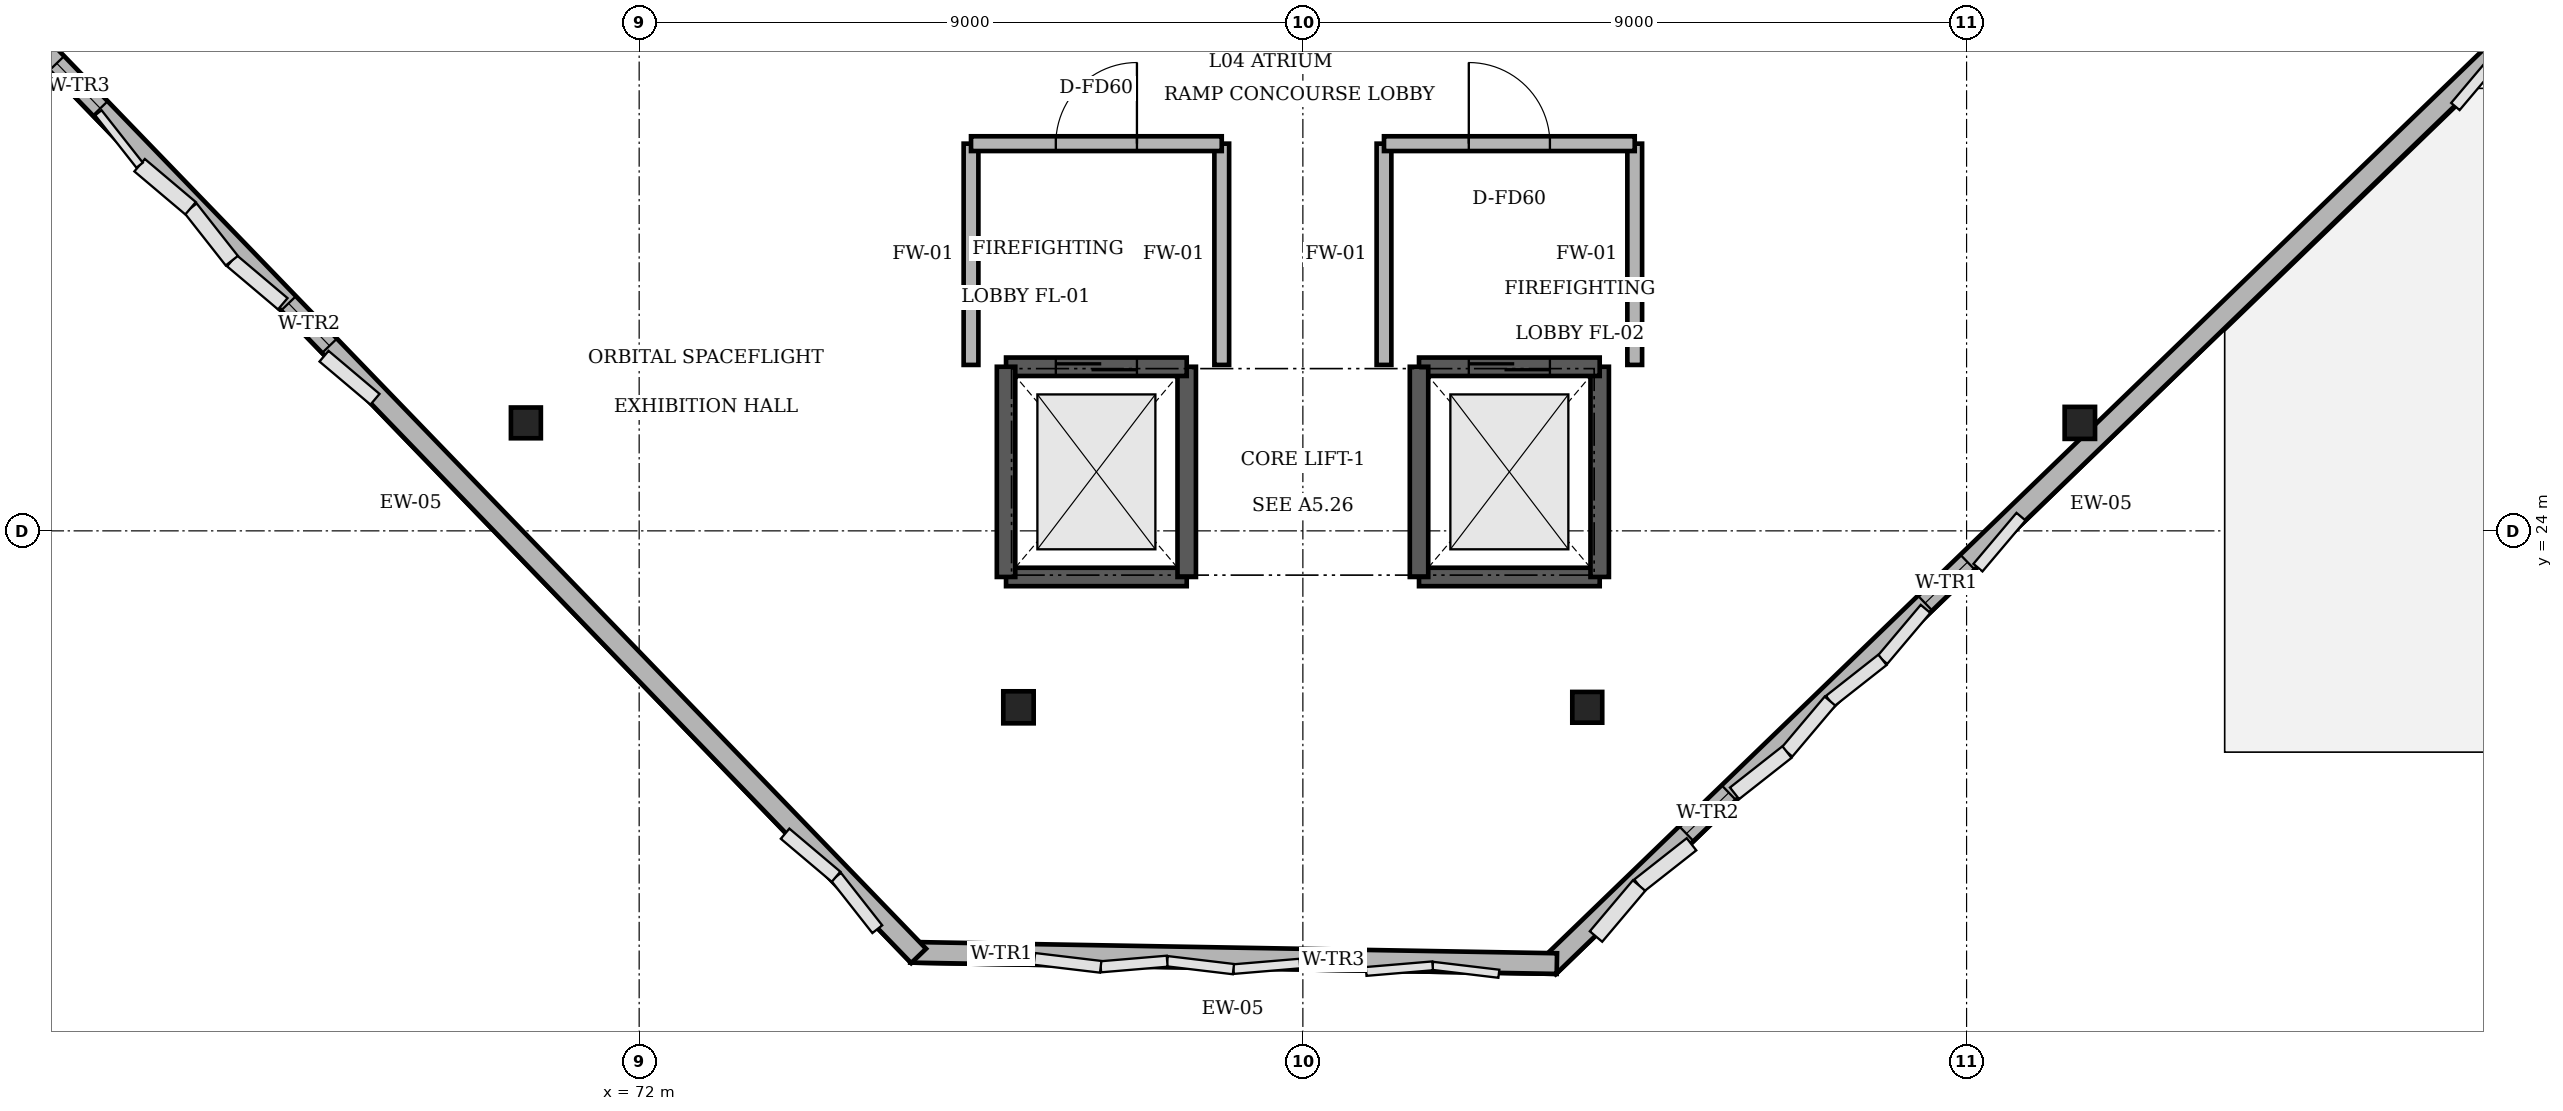
"""IFC4 building model, lengths in metres.
Left out: names, types, materials, properties, quantities, classifications, styles, units other than length and angle.
Written with IfcOpenShell. Run it as: python <this file> out.ifc"""

import sys

from ifc_helpers import new_model, si_unit, direction, frame, frame_2d, origin, origin_2d, place, context, subcontext, project, spatial, rectangle, i_section, extrude, element, fill, save


model = new_model("IFC4")
c1 = context("Model", 3, precision=1e-05, world=origin(), true_north=direction((0.0, 1.0)))
c2 = subcontext(c1, "Body", "Model", "MODEL_VIEW")
j1 = project(units=[si_unit("LENGTHUNIT", "METRE"), si_unit("PLANEANGLEUNIT", "RADIAN")], contexts=[c1])
p1 = place(None, origin())
s1 = spatial("IfcSite", under=j1, at=p1, CompositionType="ELEMENT")
p2 = place(p1, origin())
s2 = spatial("IfcBuilding", under=s1, at=p2, CompositionType="ELEMENT")
p3 = place(p2, frame((0.0, 0.0, 20.4)))
s3 = spatial("IfcBuildingStorey", under=s2, at=p3, CompositionType="ELEMENT", Elevation=20.4)
p4 = place(p3, frame((70.464, 25.464, 0.0), z_axis=(0.0, 0.0, 1.0), x_axis=(1.0, 0.0, 0.0)))
e1 = element("IfcColumn", 1, at=p4, inside=s3, PredefinedType="COLUMN", context=c2, shape_type="SweptSolid", body=[
    extrude(i_section(OverallWidth=0.406, OverallDepth=0.417, WebThickness=0.03, FlangeThickness=0.044, FilletRadius=0.015, at=origin_2d()), origin(), (0.0, 0.0, 1.0), 4.8),
])
p5 = place(p3, frame((77.144, 21.608, 0.0), z_axis=(0.0, 0.0, 1.0), x_axis=(1.0, 0.0, 0.0)))
e2 = element("IfcColumn", 2, at=p5, inside=s3, PredefinedType="COLUMN", context=c2, shape_type="SweptSolid", body=[
    extrude(i_section(OverallWidth=0.412, OverallDepth=0.434, WebThickness=0.036, FlangeThickness=0.044, FilletRadius=0.015, at=origin_2d()), origin(), (0.0, 0.0, 1.0), 4.8),
])
p6 = place(p3, frame((84.856, 21.608, 0.0), z_axis=(0.0, 0.0, 1.0), x_axis=(1.0, 0.0, 0.0)))
e3 = element("IfcColumn", 3, at=p6, inside=s3, PredefinedType="COLUMN", context=c2, shape_type="SweptSolid", body=[
    extrude(i_section(OverallWidth=0.406, OverallDepth=0.417, WebThickness=0.03, FlangeThickness=0.044, FilletRadius=0.015, at=origin_2d()), origin(), (0.0, 0.0, 1.0), 4.8),
])
p7 = place(p3, frame((91.536, 25.464, 0.0), z_axis=(0.0, 0.0, 1.0), x_axis=(1.0, 0.0, 0.0)))
e4 = element("IfcColumn", 4, at=p7, inside=s3, PredefinedType="COLUMN", context=c2, shape_type="SweptSolid", body=[
    extrude(i_section(OverallWidth=0.412, OverallDepth=0.434, WebThickness=0.036, FlangeThickness=0.044, FilletRadius=0.015, at=origin_2d()), origin(), (0.0, 0.0, 1.0), 4.8),
])
p8 = place(p3, frame((98.357, 31.634, 0.0), z_axis=(0.0, 0.0, 1.0), x_axis=(-0.719349899293, -0.694647912533, 0.0)))
e5 = element("IfcWall", 5, at=p8, inside=s3, PredefinedType="SOLIDWALL", context=c2, shape_type="SweptSolid", body=[
    extrude(rectangle(XDim=19.5, YDim=0.28, at=frame_2d((9.75, 0.0))), origin(), (0.0, 0.0, 1.0), 3.484),
])
p9 = place(p8, frame((11.6, 0.0, 1.05)))
e6 = element("IfcOpeningElement", 6, at=p9, cuts=e5, PredefinedType="OPENING", context=c2, shape_type="SweptSolid", body=[
    extrude(rectangle(XDim=0.8, YDim=1.5, at=frame_2d((0.4, 0.75))), frame((0.0, 0.15, 0.0), z_axis=(0.0, -1.0, 0.0), x_axis=(1.0, 0.0, 0.0)), (0.0, 0.0, 1.0), 0.3),
])
p10 = place(p8, frame((16.1, 0.0, 1.05)))
e7 = element("IfcOpeningElement", 7, at=p10, cuts=e5, PredefinedType="OPENING", context=c2, shape_type="SweptSolid", body=[
    extrude(rectangle(XDim=0.8, YDim=1.7, at=frame_2d((0.4, 0.85))), frame((0.0, 0.15, 0.0), z_axis=(0.0, -1.0, 0.0), x_axis=(1.0, 0.0, 0.0)), (0.0, 0.0, 1.0), 0.3),
])
p11 = place(p3, frame((84.444, 18.133, 0.0), z_axis=(0.0, 0.0, 1.0), x_axis=(-0.999847586528, 0.017458628627, 0.0)))
e8 = element("IfcWall", 8, at=p11, inside=s3, PredefinedType="SOLIDWALL", context=c2, shape_type="SweptSolid", body=[
    extrude(rectangle(XDim=8.768, YDim=0.28, at=frame_2d((4.384, 0.0))), origin(), (0.0, 0.0, 1.0), 3.629),
])
p12 = place(p11, frame((2.609, 0.0, 1.05)))
e9 = element("IfcOpeningElement", 9, at=p12, cuts=e8, PredefinedType="OPENING", context=c2, shape_type="SweptSolid", body=[
    extrude(rectangle(XDim=0.85, YDim=1.6, at=frame_2d((0.425, 0.8))), frame((0.0, 0.15, 0.0), z_axis=(0.0, -1.0, 0.0), x_axis=(1.0, 0.0, 0.0)), (0.0, 0.0, 1.0), 0.3),
])
p13 = place(p11, frame((7.134, 0.0, 1.05)))
e10 = element("IfcOpeningElement", 10, at=p13, cuts=e8, PredefinedType="OPENING", context=c2, shape_type="SweptSolid", body=[
    extrude(rectangle(XDim=0.8, YDim=1.5, at=frame_2d((0.4, 0.75))), frame((0.0, 0.15, 0.0), z_axis=(0.0, -1.0, 0.0), x_axis=(1.0, 0.0, 0.0)), (0.0, 0.0, 1.0), 0.3),
])
p14 = place(p3, frame((75.79, 18.237, 0.0), z_axis=(0.0, 0.0, 1.0), x_axis=(-0.694666022077, 0.719332411179, 0.0)))
e11 = element("IfcWall", 11, at=p14, inside=s3, PredefinedType="SOLIDWALL", context=c2, shape_type="SweptSolid", body=[
    extrude(rectangle(XDim=18.4, YDim=0.28, at=frame_2d((9.2, 0.0))), origin(), (0.0, 0.0, 1.0), 3.634),
])
p15 = place(p14, frame((11.5, 0.0, 1.05)))
e12 = element("IfcOpeningElement", 12, at=p15, cuts=e11, PredefinedType="OPENING", context=c2, shape_type="SweptSolid", body=[
    extrude(rectangle(XDim=0.8, YDim=1.7, at=frame_2d((0.4, 0.85))), frame((0.0, 0.15, 0.0), z_axis=(0.0, -1.0, 0.0), x_axis=(1.0, 0.0, 0.0)), (0.0, 0.0, 1.0), 0.3),
])
p16 = place(p14, frame((15.975, 0.0, 1.05)))
e13 = element("IfcOpeningElement", 13, at=p16, cuts=e11, PredefinedType="OPENING", context=c2, shape_type="SweptSolid", body=[
    extrude(rectangle(XDim=0.85, YDim=1.6, at=frame_2d((0.425, 0.8))), frame((0.0, 0.15, 0.0), z_axis=(0.0, -1.0, 0.0), x_axis=(1.0, 0.0, 0.0)), (0.0, 0.0, 1.0), 0.3),
])
p17 = place(p3, frame((76.975, 23.375, 0.0), z_axis=(0.0, 0.0, 1.0), x_axis=(1.0, 0.0, 0.0)))
e14 = element("IfcWall", 14, at=p17, inside=s3, PredefinedType="SOLIDWALL", context=c2, shape_type="SweptSolid", body=[
    extrude(rectangle(XDim=2.45, YDim=0.25, at=frame_2d((1.225, 0.0))), origin(), (0.0, 0.0, 1.0), 4.8),
])
p18 = place(p3, frame((79.425, 23.375, 0.0), z_axis=(0.0, 0.0, 1.0), x_axis=(0.0, 1.0, 0.0)))
e15 = element("IfcWall", 15, at=p18, inside=s3, PredefinedType="SOLIDWALL", context=c2, shape_type="SweptSolid", body=[
    extrude(rectangle(XDim=2.85, YDim=0.25, at=frame_2d((1.425, 0.0))), origin(), (0.0, 0.0, 1.0), 4.8),
])
p19 = place(p3, frame((79.425, 26.225, 0.0), z_axis=(0.0, 0.0, 1.0), x_axis=(-1.0, 0.0, 0.0)))
e16 = element("IfcWall", 16, at=p19, inside=s3, PredefinedType="SOLIDWALL", context=c2, shape_type="SweptSolid", body=[
    extrude(rectangle(XDim=2.45, YDim=0.25, at=frame_2d((1.225, 0.0))), origin(), (0.0, 0.0, 1.0), 4.8),
])
p20 = place(p19, frame((0.675, 0.0, 0.0)))
e17 = element("IfcOpeningElement", 17, at=p20, cuts=e16, PredefinedType="OPENING", context=c2, shape_type="SweptSolid", body=[
    extrude(rectangle(XDim=1.1, YDim=2.2, at=frame_2d((0.55, 1.1))), frame((0.0, 0.135, 0.0), z_axis=(0.0, -1.0, 0.0), x_axis=(1.0, 0.0, 0.0)), (0.0, 0.0, 1.0), 0.27),
])
p21 = place(p3, frame((76.975, 26.225, 0.0), z_axis=(0.0, 0.0, 1.0), x_axis=(0.0, -1.0, 0.0)))
e18 = element("IfcWall", 18, at=p21, inside=s3, PredefinedType="SOLIDWALL", context=c2, shape_type="SweptSolid", body=[
    extrude(rectangle(XDim=2.85, YDim=0.25, at=frame_2d((1.425, 0.0))), origin(), (0.0, 0.0, 1.0), 4.8),
])
p22 = place(p3, frame((76.5, 26.25, 0.0), z_axis=(0.0, 0.0, 1.0), x_axis=(0.0, 1.0, 0.0)))
e19 = element("IfcWall", 19, at=p22, inside=s3, PredefinedType="SOLIDWALL", context=c2, shape_type="SweptSolid", body=[
    extrude(rectangle(XDim=3.0, YDim=0.2, at=frame_2d((1.5, 0.0))), origin(), (0.0, 0.0, 1.0), 3.626),
])
p23 = place(p3, frame((79.9, 26.25, 0.0), z_axis=(0.0, 0.0, 1.0), x_axis=(0.0, 1.0, 0.0)))
e20 = element("IfcWall", 20, at=p23, inside=s3, PredefinedType="SOLIDWALL", context=c2, shape_type="SweptSolid", body=[
    extrude(rectangle(XDim=3.0, YDim=0.2, at=frame_2d((1.5, 0.0))), origin(), (0.0, 0.0, 1.0), 3.629),
])
p24 = place(p3, frame((76.5, 29.25, 0.0), z_axis=(0.0, 0.0, 1.0), x_axis=(1.0, 0.0, 0.0)))
e21 = element("IfcWall", 21, at=p24, inside=s3, PredefinedType="SOLIDWALL", context=c2, shape_type="SweptSolid", body=[
    extrude(rectangle(XDim=3.4, YDim=0.2, at=frame_2d((1.7, 0.0))), origin(), (0.0, 0.0, 1.0), 3.626),
])
p25 = place(p24, frame((1.15, 0.0, 0.0)))
e22 = element("IfcOpeningElement", 22, at=p25, cuts=e21, PredefinedType="OPENING", context=c2, shape_type="SweptSolid", body=[
    extrude(rectangle(XDim=1.1, YDim=2.2, at=frame_2d((0.55, 1.1))), frame((0.0, 0.11, 0.0), z_axis=(0.0, -1.0, 0.0), x_axis=(1.0, 0.0, 0.0)), (0.0, 0.0, 1.0), 0.22),
])
p26 = place(p3, frame((82.575, 23.375, 0.0), z_axis=(0.0, 0.0, 1.0), x_axis=(1.0, 0.0, 0.0)))
e23 = element("IfcWall", 23, at=p26, inside=s3, PredefinedType="SOLIDWALL", context=c2, shape_type="SweptSolid", body=[
    extrude(rectangle(XDim=2.45, YDim=0.25, at=frame_2d((1.225, 0.0))), origin(), (0.0, 0.0, 1.0), 4.8),
])
p27 = place(p3, frame((85.025, 23.375, 0.0), z_axis=(0.0, 0.0, 1.0), x_axis=(0.0, 1.0, 0.0)))
e24 = element("IfcWall", 24, at=p27, inside=s3, PredefinedType="SOLIDWALL", context=c2, shape_type="SweptSolid", body=[
    extrude(rectangle(XDim=2.85, YDim=0.25, at=frame_2d((1.425, 0.0))), origin(), (0.0, 0.0, 1.0), 4.8),
])
p28 = place(p3, frame((85.025, 26.225, 0.0), z_axis=(0.0, 0.0, 1.0), x_axis=(-1.0, 0.0, 0.0)))
e25 = element("IfcWall", 25, at=p28, inside=s3, PredefinedType="SOLIDWALL", context=c2, shape_type="SweptSolid", body=[
    extrude(rectangle(XDim=2.45, YDim=0.25, at=frame_2d((1.225, 0.0))), origin(), (0.0, 0.0, 1.0), 4.8),
])
p29 = place(p28, frame((0.675, 0.0, 0.0)))
e26 = element("IfcOpeningElement", 26, at=p29, cuts=e25, PredefinedType="OPENING", context=c2, shape_type="SweptSolid", body=[
    extrude(rectangle(XDim=1.1, YDim=2.2, at=frame_2d((0.55, 1.1))), frame((0.0, 0.135, 0.0), z_axis=(0.0, -1.0, 0.0), x_axis=(1.0, 0.0, 0.0)), (0.0, 0.0, 1.0), 0.27),
])
p30 = place(p3, frame((82.575, 26.225, 0.0), z_axis=(0.0, 0.0, 1.0), x_axis=(0.0, -1.0, 0.0)))
e27 = element("IfcWall", 27, at=p30, inside=s3, PredefinedType="SOLIDWALL", context=c2, shape_type="SweptSolid", body=[
    extrude(rectangle(XDim=2.85, YDim=0.25, at=frame_2d((1.425, 0.0))), origin(), (0.0, 0.0, 1.0), 4.8),
])
p31 = place(p3, frame((82.1, 26.25, 0.0), z_axis=(0.0, 0.0, 1.0), x_axis=(0.0, 1.0, 0.0)))
e28 = element("IfcWall", 28, at=p31, inside=s3, PredefinedType="SOLIDWALL", context=c2, shape_type="SweptSolid", body=[
    extrude(rectangle(XDim=3.0, YDim=0.2, at=frame_2d((1.5, 0.0))), origin(), (0.0, 0.0, 1.0), 4.0),
])
p32 = place(p3, frame((85.5, 26.25, 0.0), z_axis=(0.0, 0.0, 1.0), x_axis=(0.0, 1.0, 0.0)))
e29 = element("IfcWall", 29, at=p32, inside=s3, PredefinedType="SOLIDWALL", context=c2, shape_type="SweptSolid", body=[
    extrude(rectangle(XDim=3.0, YDim=0.2, at=frame_2d((1.5, 0.0))), origin(), (0.0, 0.0, 1.0), 3.624),
])
p33 = place(p3, frame((82.1, 29.25, 0.0), z_axis=(0.0, 0.0, 1.0), x_axis=(1.0, 0.0, 0.0)))
e30 = element("IfcWall", 30, at=p33, inside=s3, PredefinedType="SOLIDWALL", context=c2, shape_type="SweptSolid", body=[
    extrude(rectangle(XDim=3.4, YDim=0.2, at=frame_2d((1.7, 0.0))), origin(), (0.0, 0.0, 1.0), 3.624),
])
p34 = place(p33, frame((1.15, 0.0, 0.0)))
e31 = element("IfcOpeningElement", 31, at=p34, cuts=e30, PredefinedType="OPENING", context=c2, shape_type="SweptSolid", body=[
    extrude(rectangle(XDim=1.1, YDim=2.2, at=frame_2d((0.55, 1.1))), frame((0.0, 0.11, 0.0), z_axis=(0.0, -1.0, 0.0), x_axis=(1.0, 0.0, 0.0)), (0.0, 0.0, 1.0), 0.22),
])
p35 = place(p9, origin())
e32 = element("IfcWindow", 32, at=p35, inside=s3, PartitioningType="SINGLE_PANEL", PredefinedType="WINDOW", context=c2, shape_type="SweptSolid", body=[
    extrude(rectangle(XDim=0.8, YDim=1.5, at=frame_2d((0.4, 0.75))), frame((0.0, 0.03, 0.0), z_axis=(0.0, -1.0, 0.0), x_axis=(1.0, 0.0, 0.0)), (0.0, 0.0, 1.0), 0.06),
])
fill(e6, e32)
p36 = place(p10, origin())
e33 = element("IfcWindow", 33, at=p36, inside=s3, PartitioningType="SINGLE_PANEL", PredefinedType="WINDOW", context=c2, shape_type="SweptSolid", body=[
    extrude(rectangle(XDim=0.8, YDim=1.7, at=frame_2d((0.4, 0.85))), frame((0.0, 0.03, 0.0), z_axis=(0.0, -1.0, 0.0), x_axis=(1.0, 0.0, 0.0)), (0.0, 0.0, 1.0), 0.06),
])
fill(e7, e33)
p37 = place(p12, origin())
e34 = element("IfcWindow", 34, at=p37, inside=s3, PartitioningType="SINGLE_PANEL", PredefinedType="WINDOW", context=c2, shape_type="SweptSolid", body=[
    extrude(rectangle(XDim=0.85, YDim=1.6, at=frame_2d((0.425, 0.8))), frame((0.0, 0.03, 0.0), z_axis=(0.0, -1.0, 0.0), x_axis=(1.0, 0.0, 0.0)), (0.0, 0.0, 1.0), 0.06),
])
fill(e9, e34)
p38 = place(p13, origin())
e35 = element("IfcWindow", 35, at=p38, inside=s3, PartitioningType="SINGLE_PANEL", PredefinedType="WINDOW", context=c2, shape_type="SweptSolid", body=[
    extrude(rectangle(XDim=0.8, YDim=1.5, at=frame_2d((0.4, 0.75))), frame((0.0, 0.03, 0.0), z_axis=(0.0, -1.0, 0.0), x_axis=(1.0, 0.0, 0.0)), (0.0, 0.0, 1.0), 0.06),
])
fill(e10, e35)
p39 = place(p15, origin())
e36 = element("IfcWindow", 36, at=p39, inside=s3, PartitioningType="SINGLE_PANEL", PredefinedType="WINDOW", context=c2, shape_type="SweptSolid", body=[
    extrude(rectangle(XDim=0.8, YDim=1.7, at=frame_2d((0.4, 0.85))), frame((0.0, 0.03, 0.0), z_axis=(0.0, -1.0, 0.0), x_axis=(1.0, 0.0, 0.0)), (0.0, 0.0, 1.0), 0.06),
])
fill(e12, e36)
p40 = place(p16, origin())
e37 = element("IfcWindow", 37, at=p40, inside=s3, PartitioningType="SINGLE_PANEL", PredefinedType="WINDOW", context=c2, shape_type="SweptSolid", body=[
    extrude(rectangle(XDim=0.85, YDim=1.6, at=frame_2d((0.425, 0.8))), frame((0.0, 0.03, 0.0), z_axis=(0.0, -1.0, 0.0), x_axis=(1.0, 0.0, 0.0)), (0.0, 0.0, 1.0), 0.06),
])
fill(e13, e37)
p41 = place(p20, origin())
e38 = element("IfcDoor", 38, at=p41, inside=s3, OperationType="SLIDING_TO_LEFT", PredefinedType="DOOR", context=c2, shape_type="SweptSolid", body=[
    extrude(rectangle(XDim=1.1, YDim=2.2, at=frame_2d((0.55, 1.1))), frame((0.0, 0.025, 0.0), z_axis=(0.0, -1.0, 0.0), x_axis=(1.0, 0.0, 0.0)), (0.0, 0.0, 1.0), 0.05),
])
fill(e17, e38)
p42 = place(p25, origin())
e39 = element("IfcDoor", 39, at=p42, inside=s3, OperationType="SINGLE_SWING_RIGHT", PredefinedType="DOOR", context=c2, shape_type="SweptSolid", body=[
    extrude(rectangle(XDim=1.1, YDim=2.2, at=frame_2d((0.55, 1.1))), frame((0.0, 0.025, 0.0), z_axis=(0.0, -1.0, 0.0), x_axis=(1.0, 0.0, 0.0)), (0.0, 0.0, 1.0), 0.05),
])
fill(e22, e39)
p43 = place(p29, origin())
e40 = element("IfcDoor", 40, at=p43, inside=s3, OperationType="SLIDING_TO_LEFT", PredefinedType="DOOR", context=c2, shape_type="SweptSolid", body=[
    extrude(rectangle(XDim=1.1, YDim=2.2, at=frame_2d((0.55, 1.1))), frame((0.0, 0.025, 0.0), z_axis=(0.0, -1.0, 0.0), x_axis=(1.0, 0.0, 0.0)), (0.0, 0.0, 1.0), 0.05),
])
fill(e26, e40)
p44 = place(p34, origin())
e41 = element("IfcDoor", 41, at=p44, inside=s3, OperationType="SINGLE_SWING_LEFT", PredefinedType="DOOR", context=c2, shape_type="SweptSolid", body=[
    extrude(rectangle(XDim=1.1, YDim=2.2, at=frame_2d((0.55, 1.1))), frame((0.0, 0.025, 0.0), z_axis=(0.0, -1.0, 0.0), x_axis=(1.0, 0.0, 0.0)), (0.0, 0.0, 1.0), 0.05),
])
fill(e31, e41)
save(model, sys.argv[1])
